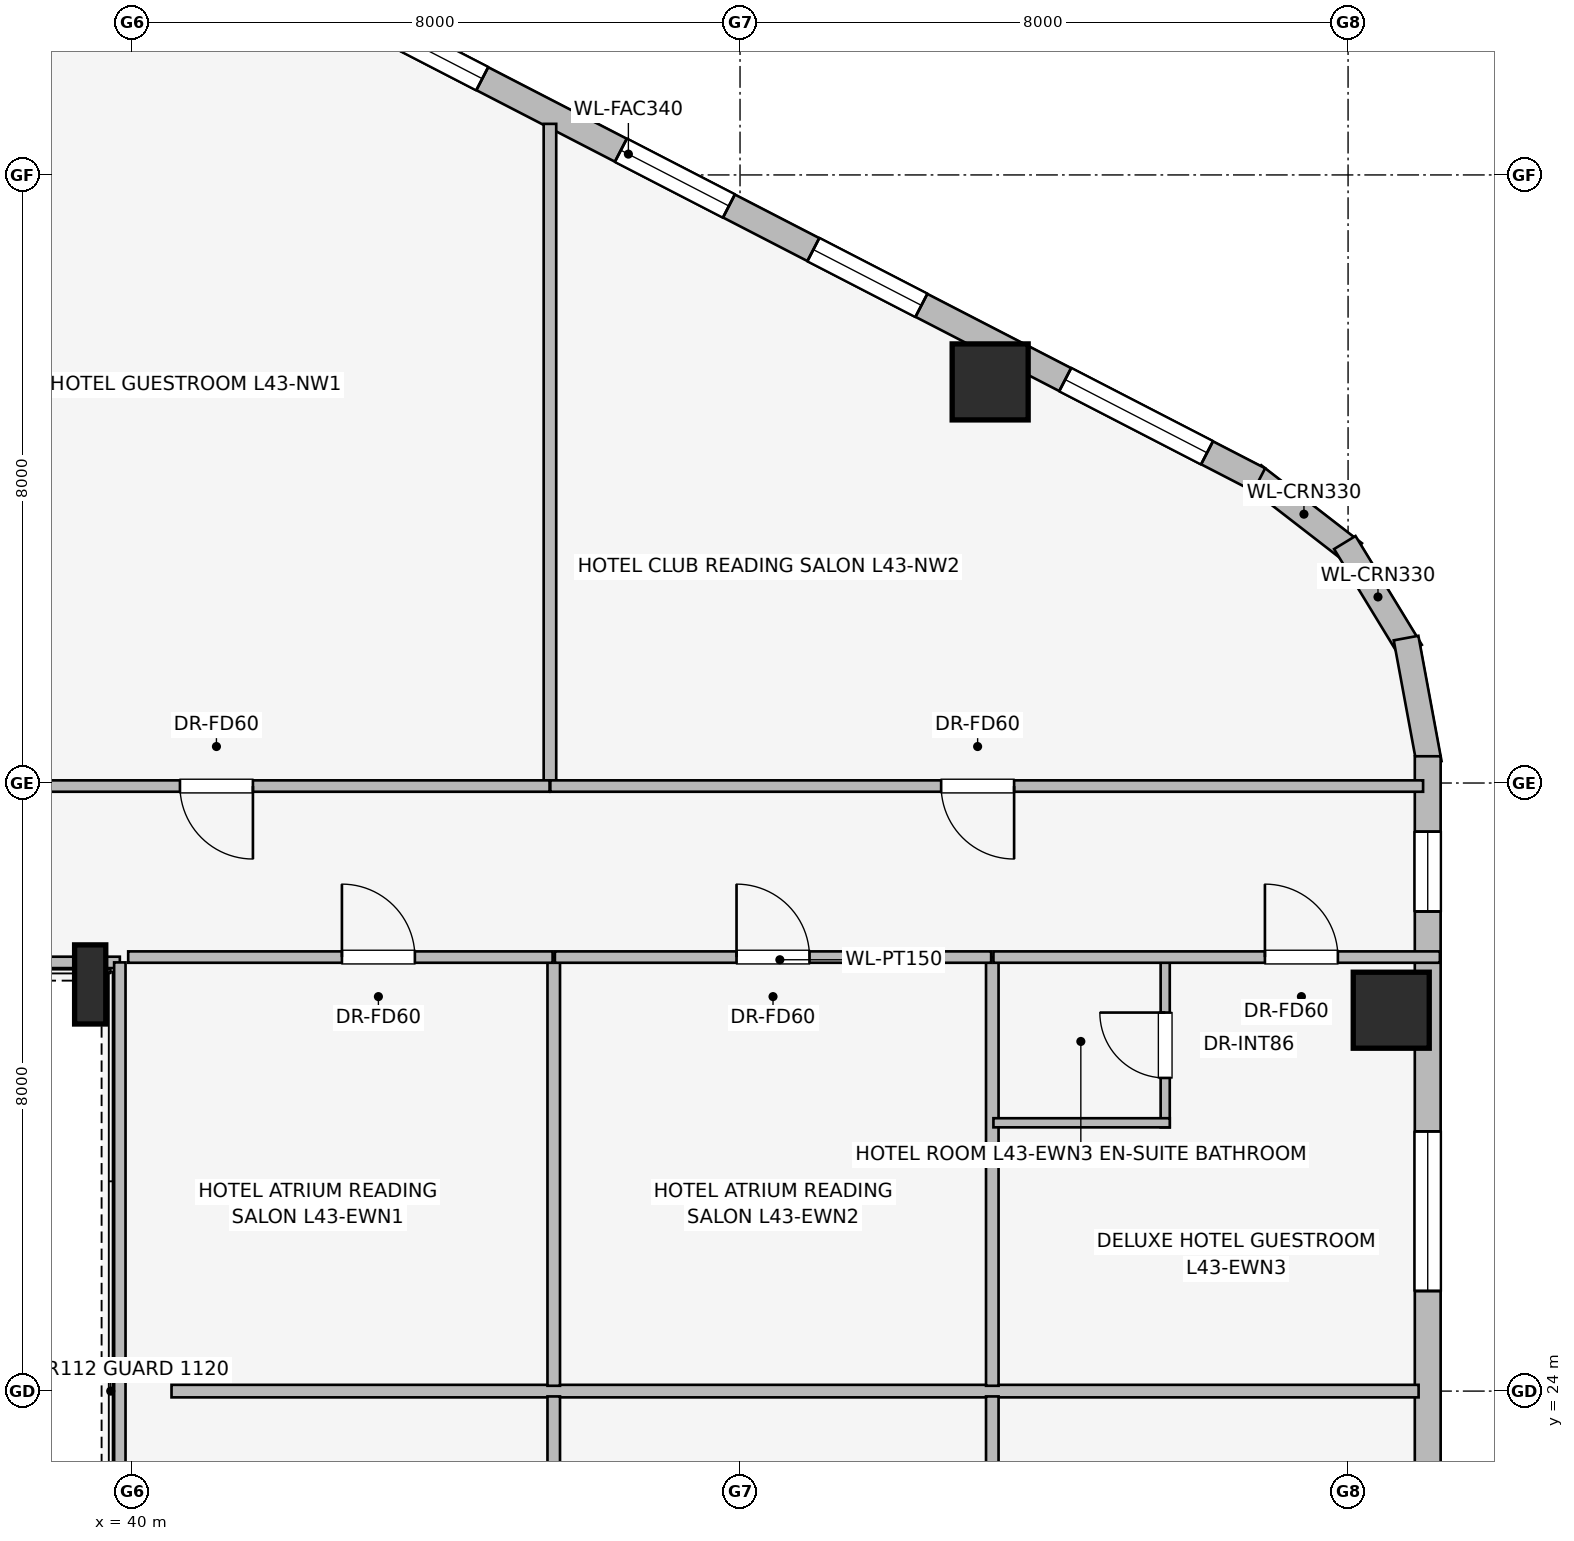
"""IFC4 building model, lengths in metres.
Left out: names, types, materials, properties, quantities, classifications, styles, units other than length and angle.
Written with IfcOpenShell. Run it as: python <this file> out.ifc"""

import sys

from ifc_helpers import new_model, si_unit, direction, frame, frame_2d, origin, origin_2d, place, context, subcontext, project, spatial, rectangle, i_section, extrude, element, fill, save


model = new_model("IFC4")
c1 = context("Model", 3, precision=1e-05, world=origin(), true_north=direction((0.0, 1.0)))
c2 = subcontext(c1, "Body", "Model", "MODEL_VIEW")
j1 = project(units=[si_unit("LENGTHUNIT", "METRE"), si_unit("PLANEANGLEUNIT", "RADIAN")], contexts=[c1])
p1 = place(None, origin())
s1 = spatial("IfcSite", under=j1, at=p1, CompositionType="ELEMENT")
p2 = place(p1, origin())
s2 = spatial("IfcBuilding", under=s1, at=p2, CompositionType="ELEMENT")
p3 = place(p2, frame((0.0, 0.0, 160.2)))
s3 = spatial("IfcBuildingStorey", under=s2, at=p3, CompositionType="ELEMENT", Elevation=160.2)
for number, where, z_axis, x_axis in (
    (1, (51.291, 37.277, 0.0), (0.0, 0.0, 1.0), (1.0, 0.0, 0.0)),
    (2, (56.568, 29.011, 0.0), (0.0, 0.0, 1.0), (1.0, 0.0, 0.0)),
):
    element("IfcColumn", number, at=place(p3, frame(where, z_axis=z_axis, x_axis=x_axis)), inside=s3, PredefinedType="COLUMN", context=c2, shape_type="SweptSolid", body=[
        extrude(rectangle(XDim=1.0, YDim=1.0, at=origin_2d()), origin(), (0.0, 0.0, 1.0), 3.45),
    ])
p4 = place(p3, frame((39.45, 29.35, 0.0), z_axis=(0.0, 0.0, 1.0), x_axis=(1.0, 0.0, 0.0)))
e3 = element("IfcColumn", 3, at=p4, inside=s3, PredefinedType="COLUMN", context=c2, shape_type="SweptSolid", body=[
    extrude(i_section(OverallWidth=0.41, OverallDepth=1.041, WebThickness=0.031, FlangeThickness=0.056, at=origin_2d()), origin(), (0.0, 0.0, 1.0), 3.45),
])
p5 = place(p3, frame((54.757, 36.05, 0.0), z_axis=(0.0, 0.0, 1.0), x_axis=(0.790621329885, -0.612305408053, 0.0)))
e4 = element("IfcWall", 4, at=p5, inside=s3, PredefinedType="STANDARD", context=c2, shape_type="SweptSolid", body=[
    extrude(rectangle(XDim=1.676, YDim=0.33, at=frame_2d((0.838, 0.0))), origin(), (0.0, 0.0, 1.0), 3.03),
])
p6 = place(p3, frame((55.957, 35.164, 0.0), z_axis=(0.0, 0.0, 1.0), x_axis=(0.520519429557, -0.853849824883, 0.0)))
e5 = element("IfcWall", 5, at=p6, inside=s3, PredefinedType="STANDARD", context=c2, shape_type="SweptSolid", body=[
    extrude(rectangle(XDim=1.677, YDim=0.33, at=frame_2d((0.839, 0.0))), origin(), (0.0, 0.0, 1.0), 3.03),
])
p7 = place(p3, frame((56.763, 33.907, 0.0), z_axis=(0.0, 0.0, 1.0), x_axis=(0.181984991895, -0.983301308209, 0.0)))
e6 = element("IfcWall", 6, at=p7, inside=s3, PredefinedType="STANDARD", context=c2, shape_type="SweptSolid", body=[
    extrude(rectangle(XDim=1.677, YDim=0.33, at=frame_2d((0.838, 0.0))), origin(), (0.0, 0.0, 1.0), 3.03),
])
p8 = place(p3, frame((38.231, 44.558, 0.0), z_axis=(0.0, 0.0, 1.0), x_axis=(0.888613612362, -0.458656568606, 0.0)))
e7 = element("IfcWall", 7, at=p8, inside=s3, PredefinedType="STANDARD", context=c2, shape_type="SweptSolid", body=[
    extrude(rectangle(XDim=18.681, YDim=0.34, at=frame_2d((9.34, 0.0))), origin(), (0.0, 0.0, 1.0), 3.03),
])
p9 = place(p8, frame((1.023, 0.0, 0.75)))
e8 = element("IfcOpeningElement", 8, at=p9, cuts=e7, PredefinedType="OPENING", context=c2, shape_type="SweptSolid", body=[
    extrude(rectangle(XDim=1.6, YDim=1.55, at=frame_2d((0.8, 0.775))), frame((0.0, 0.18, 0.0), z_axis=(0.0, -1.0, 0.0), x_axis=(1.0, 0.0, 0.0)), (0.0, 0.0, 1.0), 0.36),
])
p10 = place(p8, frame((5.077, 0.0, 0.75)))
e9 = element("IfcOpeningElement", 9, at=p10, cuts=e7, PredefinedType="OPENING", context=c2, shape_type="SweptSolid", body=[
    extrude(rectangle(XDim=2.1, YDim=1.5, at=frame_2d((1.05, 0.75))), frame((0.0, 0.18, 0.0), z_axis=(0.0, -1.0, 0.0), x_axis=(1.0, 0.0, 0.0)), (0.0, 0.0, 1.0), 0.36),
])
p11 = place(p8, frame((9.229, 0.0, 0.75)))
e10 = element("IfcOpeningElement", 10, at=p11, cuts=e7, PredefinedType="OPENING", context=c2, shape_type="SweptSolid", body=[
    extrude(rectangle(XDim=1.6, YDim=1.55, at=frame_2d((0.8, 0.775))), frame((0.0, 0.18, 0.0), z_axis=(0.0, -1.0, 0.0), x_axis=(1.0, 0.0, 0.0)), (0.0, 0.0, 1.0), 0.36),
])
p12 = place(p8, frame((12.079, 0.0, 0.75)))
e11 = element("IfcOpeningElement", 11, at=p12, cuts=e7, PredefinedType="OPENING", context=c2, shape_type="SweptSolid", body=[
    extrude(rectangle(XDim=1.6, YDim=1.55, at=frame_2d((0.8, 0.775))), frame((0.0, 0.18, 0.0), z_axis=(0.0, -1.0, 0.0), x_axis=(1.0, 0.0, 0.0)), (0.0, 0.0, 1.0), 0.36),
])
p13 = place(p8, frame((15.808, 0.0, 0.75)))
e12 = element("IfcOpeningElement", 12, at=p13, cuts=e7, PredefinedType="OPENING", context=c2, shape_type="SweptSolid", body=[
    extrude(rectangle(XDim=2.1, YDim=1.5, at=frame_2d((1.05, 0.75))), frame((0.0, 0.18, 0.0), z_axis=(0.0, -1.0, 0.0), x_axis=(1.0, 0.0, 0.0)), (0.0, 0.0, 1.0), 0.36),
])
p14 = place(p3, frame((57.048, 32.352, 0.0), z_axis=(0.0, 0.0, 1.0), x_axis=(0.0, -1.0, 0.0)))
e13 = element("IfcWall", 13, at=p14, inside=s3, PredefinedType="STANDARD", context=c2, shape_type="SweptSolid", body=[
    extrude(rectangle(XDim=16.704, YDim=0.34, at=frame_2d((8.352, 0.0))), origin(), (0.0, 0.0, 1.0), 3.03),
])
p15 = place(p14, frame((0.992, 0.0, 0.75)))
e14 = element("IfcOpeningElement", 14, at=p15, cuts=e13, PredefinedType="OPENING", context=c2, shape_type="SweptSolid", body=[
    extrude(rectangle(XDim=1.05, YDim=1.4, at=frame_2d((0.525, 0.7))), frame((0.0, 0.18, 0.0), z_axis=(0.0, -1.0, 0.0), x_axis=(1.0, 0.0, 0.0)), (0.0, 0.0, 1.0), 0.36),
])
p16 = place(p14, frame((4.935, 0.0, 0.75)))
e15 = element("IfcOpeningElement", 15, at=p16, cuts=e13, PredefinedType="OPENING", context=c2, shape_type="SweptSolid", body=[
    extrude(rectangle(XDim=2.1, YDim=1.5, at=frame_2d((1.05, 0.75))), frame((0.0, 0.18, 0.0), z_axis=(0.0, -1.0, 0.0), x_axis=(1.0, 0.0, 0.0)), (0.0, 0.0, 1.0), 0.36),
])
p17 = place(p14, frame((9.919, 0.0, 0.75)))
e16 = element("IfcOpeningElement", 16, at=p17, cuts=e13, PredefinedType="OPENING", context=c2, shape_type="SweptSolid", body=[
    extrude(rectangle(XDim=1.6, YDim=1.55, at=frame_2d((0.8, 0.775))), frame((0.0, 0.18, 0.0), z_axis=(0.0, -1.0, 0.0), x_axis=(1.0, 0.0, 0.0)), (0.0, 0.0, 1.0), 0.36),
])
p18 = place(p14, frame((14.702, 0.0, 0.75)))
e17 = element("IfcOpeningElement", 17, at=p18, cuts=e13, PredefinedType="OPENING", context=c2, shape_type="SweptSolid", body=[
    extrude(rectangle(XDim=1.05, YDim=1.4, at=frame_2d((0.525, 0.7))), frame((0.0, 0.18, 0.0), z_axis=(0.0, -1.0, 0.0), x_axis=(1.0, 0.0, 0.0)), (0.0, 0.0, 1.0), 0.36),
])
p19 = place(p3, frame((39.84, 29.64, 0.0), z_axis=(0.0, 0.0, 1.0), x_axis=(-1.0, 0.0, 0.0)))
e18 = element("IfcWall", 18, at=p19, inside=s3, PredefinedType="PARTITIONING", context=c2, shape_type="SweptSolid", body=[
    extrude(rectangle(XDim=12.2, YDim=0.15, at=frame_2d((6.1, 0.0))), origin(), (0.0, 0.0, 1.0), 2.022),
])
p20 = place(p3, frame((39.84, 18.36, 0.0), z_axis=(0.0, 0.0, 1.0), x_axis=(0.0, 1.0, 0.0)))
e19 = element("IfcWall", 19, at=p20, inside=s3, PredefinedType="PARTITIONING", context=c2, shape_type="SweptSolid", body=[
    extrude(rectangle(XDim=11.28, YDim=0.15, at=frame_2d((5.64, 0.0))), origin(), (0.0, 0.0, 1.0), 2.022),
])
p21 = place(p3, frame((45.499, 31.97, 0.0), z_axis=(0.0, 0.0, 1.0), x_axis=(0.0, 1.0, 0.0)))
e20 = element("IfcWall", 20, at=p21, inside=s3, PredefinedType="PARTITIONING", context=c2, shape_type="SweptSolid", body=[
    extrude(rectangle(XDim=8.702, YDim=0.165, at=frame_2d((4.351, 0.0))), origin(), (0.0, 0.0, 1.0), 3.03),
])
p22 = place(p3, frame((45.494, 31.96, 0.0), z_axis=(0.0, 0.0, 1.0), x_axis=(-1.0, 0.0, 0.0)))
e21 = element("IfcWall", 21, at=p22, inside=s3, PredefinedType="PARTITIONING", context=c2, shape_type="SweptSolid", body=[
    extrude(rectangle(XDim=11.204, YDim=0.15, at=frame_2d((5.602, 0.0))), origin(), (0.0, 0.0, 1.0), 3.03),
])
p23 = place(p22, frame((3.903, 0.0, 0.0)))
e22 = element("IfcOpeningElement", 22, at=p23, cuts=e21, PredefinedType="OPENING", context=c2, shape_type="SweptSolid", body=[
    extrude(rectangle(XDim=0.96, YDim=2.0, at=frame_2d((0.48, 1.0))), frame((0.0, 0.085, 0.0), z_axis=(0.0, -1.0, 0.0), x_axis=(1.0, 0.0, 0.0)), (0.0, 0.0, 1.0), 0.17),
])
p24 = place(p3, frame((56.987, 31.96, 0.0), z_axis=(0.0, 0.0, 1.0), x_axis=(-1.0, 0.0, 0.0)))
e23 = element("IfcWall", 23, at=p24, inside=s3, PredefinedType="PARTITIONING", context=c2, shape_type="SweptSolid", body=[
    extrude(rectangle(XDim=11.483, YDim=0.15, at=frame_2d((5.742, 0.0))), origin(), (0.0, 0.0, 1.0), 3.03),
])
p25 = place(p24, frame((5.381, 0.0, 0.0)))
e24 = element("IfcOpeningElement", 24, at=p25, cuts=e23, PredefinedType="OPENING", context=c2, shape_type="SweptSolid", body=[
    extrude(rectangle(XDim=0.96, YDim=2.0, at=frame_2d((0.48, 1.0))), frame((0.0, 0.085, 0.0), z_axis=(0.0, -1.0, 0.0), x_axis=(1.0, 0.0, 0.0)), (0.0, 0.0, 1.0), 0.17),
])
p26 = place(p3, frame((40.52, 24.0, 0.0), z_axis=(0.0, 0.0, 1.0), x_axis=(1.0, 0.0, 0.0)))
e25 = element("IfcWall", 25, at=p26, inside=s3, PredefinedType="PARTITIONING", context=c2, shape_type="SweptSolid", body=[
    extrude(rectangle(XDim=16.408, YDim=0.165, at=frame_2d((8.204, 0.0))), origin(), (0.0, 0.0, 1.0), 3.03),
])
for number, where, z_axis, x_axis in (
    (26, (45.549, 24.07, 0.0), (0.0, 0.0, 1.0), (0.0, 1.0, 0.0)),
    (27, (51.319, 24.07, 0.0), (0.0, 0.0, 1.0), (0.0, 1.0, 0.0)),
):
    element("IfcWall", number, at=place(p3, frame(where, z_axis=z_axis, x_axis=x_axis)), inside=s3, PredefinedType="PARTITIONING", context=c2, shape_type="SweptSolid", body=[
        extrude(rectangle(XDim=5.64, YDim=0.165, at=frame_2d((2.82, 0.0))), origin(), (0.0, 0.0, 1.0), 3.03),
    ])
p27 = place(p3, frame((39.95, 29.71, 0.0), z_axis=(0.0, 0.0, 1.0), x_axis=(1.0, 0.0, 0.0)))
e28 = element("IfcWall", 28, at=p27, inside=s3, PredefinedType="PARTITIONING", context=c2, shape_type="SweptSolid", body=[
    extrude(rectangle(XDim=5.584, YDim=0.15, at=frame_2d((2.792, 0.0))), origin(), (0.0, 0.0, 1.0), 2.022),
])
p28 = place(p27, frame((2.812, 0.0, 0.0)))
e29 = element("IfcOpeningElement", 29, at=p28, cuts=e28, PredefinedType="OPENING", context=c2, shape_type="SweptSolid", body=[
    extrude(rectangle(XDim=0.96, YDim=2.0, at=frame_2d((0.48, 1.0))), frame((0.0, 0.085, 0.0), z_axis=(0.0, -1.0, 0.0), x_axis=(1.0, 0.0, 0.0)), (0.0, 0.0, 1.0), 0.17),
])
p29 = place(p3, frame((45.564, 29.71, 0.0), z_axis=(0.0, 0.0, 1.0), x_axis=(1.0, 0.0, 0.0)))
e30 = element("IfcWall", 30, at=p29, inside=s3, PredefinedType="PARTITIONING", context=c2, shape_type="SweptSolid", body=[
    extrude(rectangle(XDim=5.74, YDim=0.15, at=frame_2d((2.87, 0.0))), origin(), (0.0, 0.0, 1.0), 3.03),
])
p30 = place(p29, frame((2.39, 0.0, 0.0)))
e31 = element("IfcOpeningElement", 31, at=p30, cuts=e30, PredefinedType="OPENING", context=c2, shape_type="SweptSolid", body=[
    extrude(rectangle(XDim=0.96, YDim=2.0, at=frame_2d((0.48, 1.0))), frame((0.0, 0.085, 0.0), z_axis=(0.0, -1.0, 0.0), x_axis=(1.0, 0.0, 0.0)), (0.0, 0.0, 1.0), 0.17),
])
p31 = place(p3, frame((53.594, 27.47, 0.0), z_axis=(0.0, 0.0, 1.0), x_axis=(0.0, 1.0, 0.0)))
e32 = element("IfcWall", 32, at=p31, inside=s3, PredefinedType="PARTITIONING", context=c2, shape_type="SweptSolid", body=[
    extrude(rectangle(XDim=2.24, YDim=0.12, at=frame_2d((1.12, 0.0))), origin(), (0.0, 0.0, 1.0), 2.022),
])
p32 = place(p31, frame((0.65, 0.0, 0.0)))
e33 = element("IfcOpeningElement", 33, at=p32, cuts=e32, PredefinedType="OPENING", context=c2, shape_type="SweptSolid", body=[
    extrude(rectangle(XDim=0.86, YDim=2.0, at=frame_2d((0.43, 1.0))), frame((0.0, 0.07, 0.0), z_axis=(0.0, -1.0, 0.0), x_axis=(1.0, 0.0, 0.0)), (0.0, 0.0, 1.0), 0.14),
])
p33 = place(p3, frame((51.334, 27.53, 0.0), z_axis=(0.0, 0.0, 1.0), x_axis=(1.0, 0.0, 0.0)))
e34 = element("IfcWall", 34, at=p33, inside=s3, PredefinedType="PARTITIONING", context=c2, shape_type="SweptSolid", body=[
    extrude(rectangle(XDim=2.32, YDim=0.12, at=frame_2d((1.16, 0.0))), origin(), (0.0, 0.0, 1.0), 3.03),
])
p34 = place(p3, frame((51.334, 29.71, 0.0), z_axis=(0.0, 0.0, 1.0), x_axis=(1.0, 0.0, 0.0)))
e35 = element("IfcWall", 35, at=p34, inside=s3, PredefinedType="PARTITIONING", context=c2, shape_type="SweptSolid", body=[
    extrude(rectangle(XDim=5.874, YDim=0.15, at=frame_2d((2.937, 0.0))), origin(), (0.0, 0.0, 1.0), 3.03),
])
p35 = place(p34, frame((3.572, 0.0, 0.0)))
e36 = element("IfcOpeningElement", 36, at=p35, cuts=e35, PredefinedType="OPENING", context=c2, shape_type="SweptSolid", body=[
    extrude(rectangle(XDim=0.96, YDim=2.0, at=frame_2d((0.48, 1.0))), frame((0.0, 0.085, 0.0), z_axis=(0.0, -1.0, 0.0), x_axis=(1.0, 0.0, 0.0)), (0.0, 0.0, 1.0), 0.17),
])
for number, where, z_axis, x_axis in (
    (37, (45.549, 18.29, 0.0), (0.0, 0.0, 1.0), (0.0, 1.0, 0.0)),
    (38, (51.319, 18.29, 0.0), (0.0, 0.0, 1.0), (0.0, 1.0, 0.0)),
):
    element("IfcWall", number, at=place(p3, frame(where, z_axis=z_axis, x_axis=x_axis)), inside=s3, PredefinedType="PARTITIONING", context=c2, shape_type="SweptSolid", body=[
        extrude(rectangle(XDim=5.64, YDim=0.165, at=frame_2d((2.82, 0.0))), origin(), (0.0, 0.0, 1.0), 3.03),
    ])
p36 = place(p10, origin())
e39 = element("IfcWindow", 39, at=p36, inside=s3, PartitioningType="SINGLE_PANEL", PredefinedType="WINDOW", context=c2, shape_type="SweptSolid", body=[
    extrude(rectangle(XDim=2.1, YDim=1.5, at=frame_2d((1.05, 0.75))), frame((0.0, 0.03, 0.0), z_axis=(0.0, -1.0, 0.0), x_axis=(1.0, 0.0, 0.0)), (0.0, 0.0, 1.0), 0.06),
])
fill(e9, e39)
p37 = place(p11, origin())
e40 = element("IfcWindow", 40, at=p37, inside=s3, PartitioningType="SINGLE_PANEL", PredefinedType="WINDOW", context=c2, shape_type="SweptSolid", body=[
    extrude(rectangle(XDim=1.6, YDim=1.55, at=frame_2d((0.8, 0.775))), frame((0.0, 0.03, 0.0), z_axis=(0.0, -1.0, 0.0), x_axis=(1.0, 0.0, 0.0)), (0.0, 0.0, 1.0), 0.06),
])
fill(e10, e40)
p38 = place(p12, origin())
e41 = element("IfcWindow", 41, at=p38, inside=s3, PartitioningType="SINGLE_PANEL", PredefinedType="WINDOW", context=c2, shape_type="SweptSolid", body=[
    extrude(rectangle(XDim=1.6, YDim=1.55, at=frame_2d((0.8, 0.775))), frame((0.0, 0.03, 0.0), z_axis=(0.0, -1.0, 0.0), x_axis=(1.0, 0.0, 0.0)), (0.0, 0.0, 1.0), 0.06),
])
fill(e11, e41)
p39 = place(p13, origin())
e42 = element("IfcWindow", 42, at=p39, inside=s3, PartitioningType="SINGLE_PANEL", PredefinedType="WINDOW", context=c2, shape_type="SweptSolid", body=[
    extrude(rectangle(XDim=2.1, YDim=1.5, at=frame_2d((1.05, 0.75))), frame((0.0, 0.03, 0.0), z_axis=(0.0, -1.0, 0.0), x_axis=(1.0, 0.0, 0.0)), (0.0, 0.0, 1.0), 0.06),
])
fill(e12, e42)
p40 = place(p15, origin())
e43 = element("IfcWindow", 43, at=p40, inside=s3, PartitioningType="SINGLE_PANEL", PredefinedType="WINDOW", context=c2, shape_type="SweptSolid", body=[
    extrude(rectangle(XDim=1.05, YDim=1.4, at=frame_2d((0.525, 0.7))), frame((0.0, 0.03, 0.0), z_axis=(0.0, -1.0, 0.0), x_axis=(1.0, 0.0, 0.0)), (0.0, 0.0, 1.0), 0.06),
])
fill(e14, e43)
p41 = place(p16, origin())
e44 = element("IfcWindow", 44, at=p41, inside=s3, PartitioningType="SINGLE_PANEL", PredefinedType="WINDOW", context=c2, shape_type="SweptSolid", body=[
    extrude(rectangle(XDim=2.1, YDim=1.5, at=frame_2d((1.05, 0.75))), frame((0.0, 0.03, 0.0), z_axis=(0.0, -1.0, 0.0), x_axis=(1.0, 0.0, 0.0)), (0.0, 0.0, 1.0), 0.06),
])
fill(e15, e44)
p42 = place(p23, origin())
e45 = element("IfcDoor", 45, at=p42, inside=s3, OperationType="SINGLE_SWING_LEFT", PredefinedType="DOOR", context=c2, shape_type="SweptSolid", body=[
    extrude(rectangle(XDim=0.96, YDim=2.0, at=frame_2d((0.48, 1.0))), frame((0.0, 0.025, 0.0), z_axis=(0.0, -1.0, 0.0), x_axis=(1.0, 0.0, 0.0)), (0.0, 0.0, 1.0), 0.05),
])
fill(e22, e45)
p43 = place(p25, origin())
e46 = element("IfcDoor", 46, at=p43, inside=s3, OperationType="SINGLE_SWING_LEFT", PredefinedType="DOOR", context=c2, shape_type="SweptSolid", body=[
    extrude(rectangle(XDim=0.96, YDim=2.0, at=frame_2d((0.48, 1.0))), frame((0.0, 0.025, 0.0), z_axis=(0.0, -1.0, 0.0), x_axis=(1.0, 0.0, 0.0)), (0.0, 0.0, 1.0), 0.05),
])
fill(e24, e46)
p44 = place(p28, origin())
e47 = element("IfcDoor", 47, at=p44, inside=s3, OperationType="SINGLE_SWING_LEFT", PredefinedType="DOOR", context=c2, shape_type="SweptSolid", body=[
    extrude(rectangle(XDim=0.96, YDim=2.0, at=frame_2d((0.48, 1.0))), frame((0.0, 0.025, 0.0), z_axis=(0.0, -1.0, 0.0), x_axis=(1.0, 0.0, 0.0)), (0.0, 0.0, 1.0), 0.05),
])
fill(e29, e47)
p45 = place(p30, origin())
e48 = element("IfcDoor", 48, at=p45, inside=s3, OperationType="SINGLE_SWING_LEFT", PredefinedType="DOOR", context=c2, shape_type="SweptSolid", body=[
    extrude(rectangle(XDim=0.96, YDim=2.0, at=frame_2d((0.48, 1.0))), frame((0.0, 0.025, 0.0), z_axis=(0.0, -1.0, 0.0), x_axis=(1.0, 0.0, 0.0)), (0.0, 0.0, 1.0), 0.05),
])
fill(e31, e48)
p46 = place(p32, origin())
e49 = element("IfcDoor", 49, at=p46, inside=s3, OperationType="SINGLE_SWING_RIGHT", PredefinedType="DOOR", context=c2, shape_type="SweptSolid", body=[
    extrude(rectangle(XDim=0.86, YDim=2.0, at=frame_2d((0.43, 1.0))), frame((0.0, 0.025, 0.0), z_axis=(0.0, -1.0, 0.0), x_axis=(1.0, 0.0, 0.0)), (0.0, 0.0, 1.0), 0.05),
])
fill(e33, e49)
p47 = place(p35, origin())
e50 = element("IfcDoor", 50, at=p47, inside=s3, OperationType="SINGLE_SWING_LEFT", PredefinedType="DOOR", context=c2, shape_type="SweptSolid", body=[
    extrude(rectangle(XDim=0.96, YDim=2.0, at=frame_2d((0.48, 1.0))), frame((0.0, 0.025, 0.0), z_axis=(0.0, -1.0, 0.0), x_axis=(1.0, 0.0, 0.0)), (0.0, 0.0, 1.0), 0.05),
])
fill(e36, e50)
save(model, sys.argv[1])
